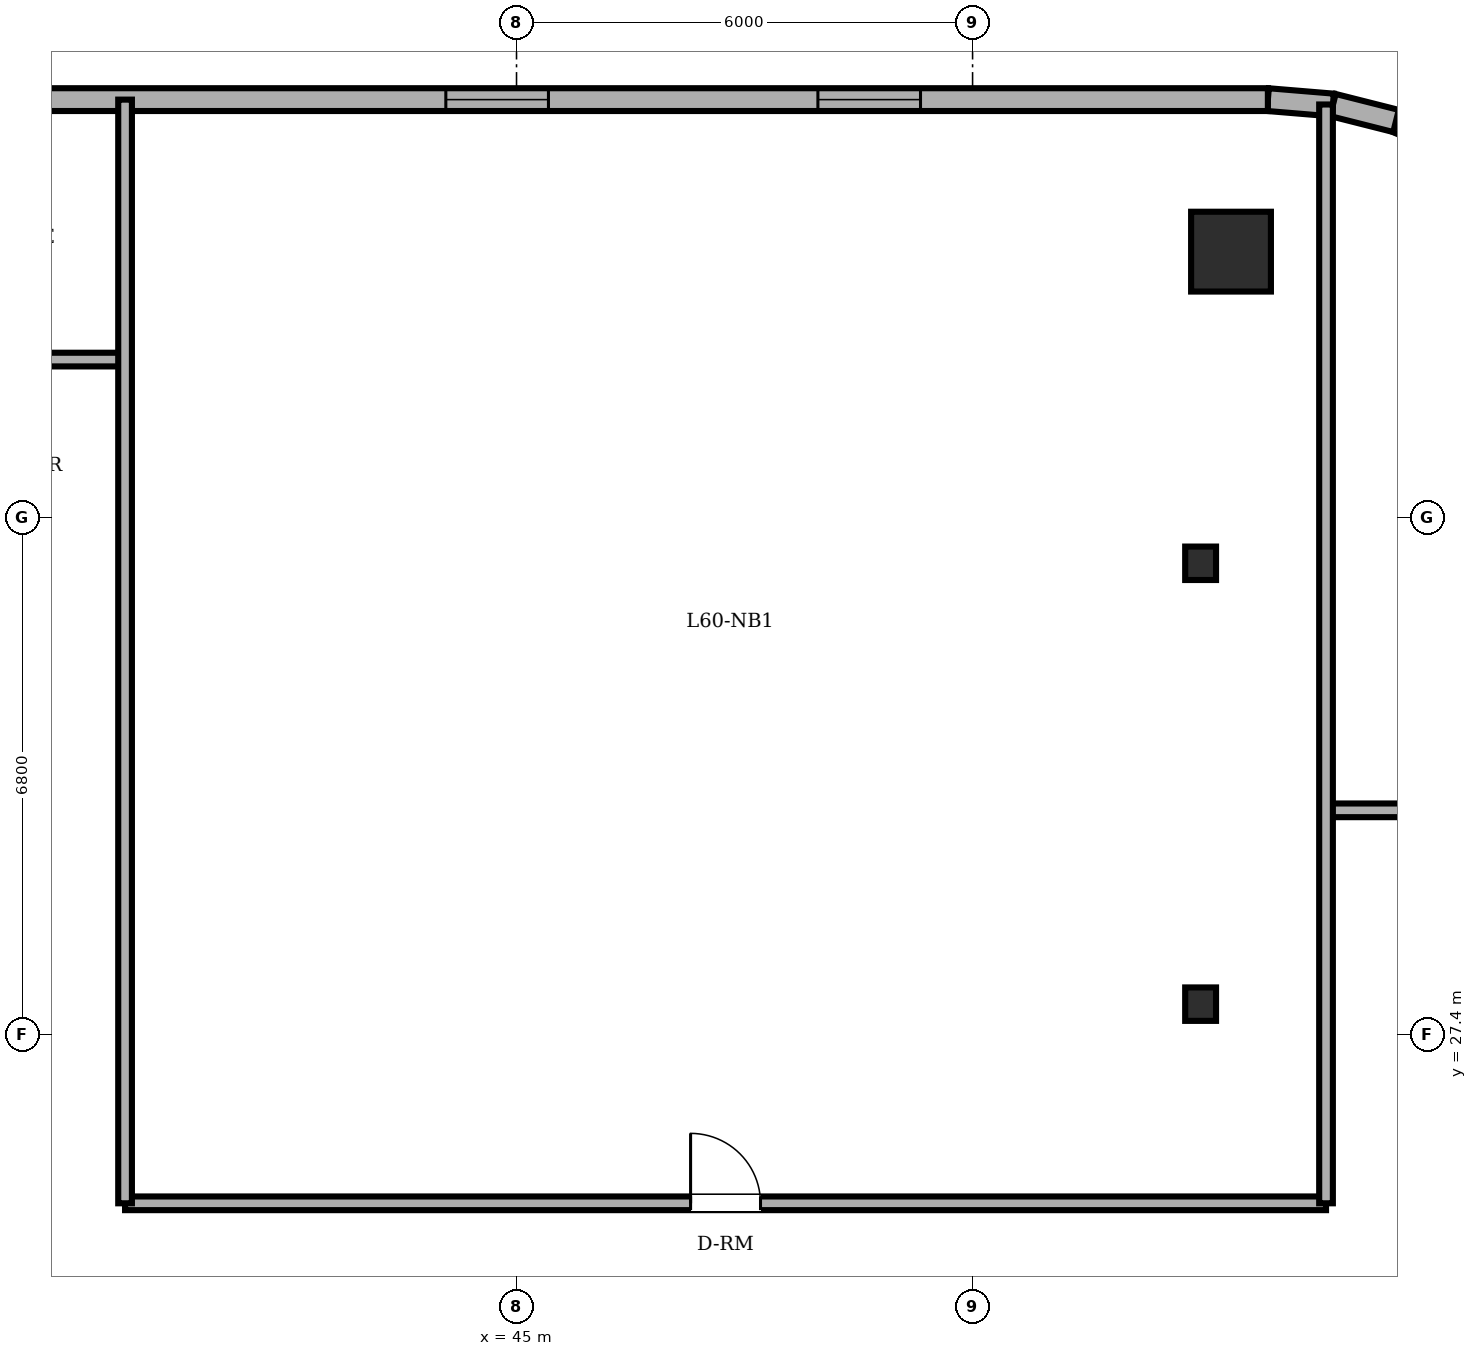
"""IFC4 building model, lengths in metres.
Left out: names, types, materials, properties, quantities, classifications, styles, units other than length and angle.
Written with IfcOpenShell. Run it as: python <this file> out.ifc"""

import sys

from ifc_helpers import new_model, si_unit, direction, frame, frame_2d, origin, origin_2d, place, context, subcontext, project, spatial, rectangle, circle, i_section, extrude, element, fill, save


model = new_model("IFC4")
c1 = context("Model", 3, precision=1e-05, world=origin(), true_north=direction((0.0, 1.0)))
c2 = subcontext(c1, "Body", "Model", "MODEL_VIEW")
j1 = project(units=[si_unit("LENGTHUNIT", "METRE"), si_unit("PLANEANGLEUNIT", "RADIAN")], contexts=[c1])
p1 = place(None, origin())
s1 = spatial("IfcSite", under=j1, at=p1, CompositionType="ELEMENT")
p2 = place(p1, origin())
s2 = spatial("IfcBuilding", under=s1, at=p2, CompositionType="ELEMENT")
p3 = place(p2, frame((0.0, 0.0, 230.1)))
s3 = spatial("IfcBuildingStorey", under=s2, at=p3, CompositionType="ELEMENT", Elevation=230.1)
p4 = place(p3, frame((54.4, 37.7, 0.0), z_axis=(0.0, 0.0, 1.0), x_axis=(1.0, 0.0, 0.0)))
e1 = element("IfcColumn", 1, at=p4, inside=s3, PredefinedType="COLUMN", context=c2, shape_type="SweptSolid", body=[
    extrude(circle(Radius=0.525, at=origin_2d()), origin(), (0.0, 0.0, 1.0), 3.6),
])
for number, where, z_axis, x_axis in (
    (2, (54.0, 27.8, 0.0), (0.0, 0.0, 1.0), (1.0, 0.0, 0.0)),
    (3, (54.0, 33.6, 0.0), (0.0, 0.0, 1.0), (1.0, 0.0, 0.0)),
):
    element("IfcColumn", number, at=place(p3, frame(where, z_axis=z_axis, x_axis=x_axis)), inside=s3, PredefinedType="COLUMN", context=c2, shape_type="SweptSolid", body=[
        extrude(i_section(OverallWidth=0.406, OverallDepth=0.44, WebThickness=0.024, FlangeThickness=0.039, FilletRadius=0.015, at=origin_2d()), origin(), (0.0, 0.0, 1.0), 3.6),
    ])
p5 = place(p3, frame((57.357, 39.075, 0.0), z_axis=(0.0, 0.0, 1.0), x_axis=(-0.916085473636, 0.400983048261, 0.0)))
e4 = element("IfcWall", 4, at=p5, inside=s3, PredefinedType="SOLIDWALL", context=c2, shape_type="SweptSolid", body=[
    extrude(rectangle(XDim=0.858, YDim=0.3, at=frame_2d((0.429, 0.0))), origin(), (0.0, 0.0, 1.0), 3.4),
])
p6 = place(p3, frame((56.571, 39.419, 0.0), z_axis=(0.0, 0.0, 1.0), x_axis=(-0.969536346338, 0.244947490555, 0.0)))
e5 = element("IfcWall", 5, at=p6, inside=s3, PredefinedType="SOLIDWALL", context=c2, shape_type="SweptSolid", body=[
    extrude(rectangle(XDim=0.857, YDim=0.3, at=frame_2d((0.429, 0.0))), origin(), (0.0, 0.0, 1.0), 3.4),
])
p7 = place(p3, frame((55.74, 39.629, 0.0), z_axis=(0.0, 0.0, 1.0), x_axis=(-0.996565355958, 0.082809971041, 0.0)))
e6 = element("IfcWall", 6, at=p7, inside=s3, PredefinedType="SOLIDWALL", context=c2, shape_type="SweptSolid", body=[
    extrude(rectangle(XDim=0.858, YDim=0.3, at=frame_2d((0.429, 0.0))), origin(), (0.0, 0.0, 1.0), 3.4),
])
p8 = place(p3, frame((54.885, 39.7, 0.0), z_axis=(0.0, 0.0, 1.0), x_axis=(-1.0, 0.0, 0.0)))
e7 = element("IfcWall", 7, at=p8, inside=s3, PredefinedType="SOLIDWALL", context=c2, shape_type="SweptSolid", body=[
    extrude(rectangle(XDim=32.485, YDim=0.3, at=frame_2d((16.243, 0.0))), origin(), (0.0, 0.0, 1.0), 3.4),
])
p9 = place(p8, frame((26.122, 0.0, 0.0)))
e8 = element("IfcOpeningElement", 8, at=p9, cuts=e7, PredefinedType="OPENING", context=c2, shape_type="SweptSolid", body=[
    extrude(rectangle(XDim=0.95, YDim=2.2, at=frame_2d((0.475, 1.1))), frame((0.0, 0.16, 0.0), z_axis=(0.0, -1.0, 0.0), x_axis=(1.0, 0.0, 0.0)), (0.0, 0.0, 1.0), 0.32),
])
p10 = place(p8, frame((4.57, 0.0, 0.85)))
e9 = element("IfcOpeningElement", 9, at=p10, cuts=e7, PredefinedType="OPENING", context=c2, shape_type="SweptSolid", body=[
    extrude(rectangle(XDim=1.35, YDim=1.55, at=frame_2d((0.675, 0.775))), frame((0.0, 0.16, 0.0), z_axis=(0.0, -1.0, 0.0), x_axis=(1.0, 0.0, 0.0)), (0.0, 0.0, 1.0), 0.32),
])
p11 = place(p8, frame((9.465, 0.0, 0.85)))
e10 = element("IfcOpeningElement", 10, at=p11, cuts=e7, PredefinedType="OPENING", context=c2, shape_type="SweptSolid", body=[
    extrude(rectangle(XDim=1.35, YDim=1.55, at=frame_2d((0.675, 0.775))), frame((0.0, 0.16, 0.0), z_axis=(0.0, -1.0, 0.0), x_axis=(1.0, 0.0, 0.0)), (0.0, 0.0, 1.0), 0.32),
])
p12 = place(p8, frame((16.577, 0.0, 0.85)))
e11 = element("IfcOpeningElement", 11, at=p12, cuts=e7, PredefinedType="OPENING", context=c2, shape_type="SweptSolid", body=[
    extrude(rectangle(XDim=1.35, YDim=1.55, at=frame_2d((0.675, 0.775))), frame((0.0, 0.16, 0.0), z_axis=(0.0, -1.0, 0.0), x_axis=(1.0, 0.0, 0.0)), (0.0, 0.0, 1.0), 0.32),
])
p13 = place(p8, frame((18.793, 0.0, 0.85)))
e12 = element("IfcOpeningElement", 12, at=p13, cuts=e7, PredefinedType="OPENING", context=c2, shape_type="SweptSolid", body=[
    extrude(rectangle(XDim=1.35, YDim=1.55, at=frame_2d((0.675, 0.775))), frame((0.0, 0.16, 0.0), z_axis=(0.0, -1.0, 0.0), x_axis=(1.0, 0.0, 0.0)), (0.0, 0.0, 1.0), 0.32),
])
p14 = place(p8, frame((22.91, 0.0, 0.85)))
e13 = element("IfcOpeningElement", 13, at=p14, cuts=e7, PredefinedType="OPENING", context=c2, shape_type="SweptSolid", body=[
    extrude(rectangle(XDim=1.35, YDim=1.55, at=frame_2d((0.675, 0.775))), frame((0.0, 0.16, 0.0), z_axis=(0.0, -1.0, 0.0), x_axis=(1.0, 0.0, 0.0)), (0.0, 0.0, 1.0), 0.32),
])
p15 = place(p8, frame((29.835, 0.0, 0.85)))
e14 = element("IfcOpeningElement", 14, at=p15, cuts=e7, PredefinedType="OPENING", context=c2, shape_type="SweptSolid", body=[
    extrude(rectangle(XDim=1.35, YDim=1.55, at=frame_2d((0.675, 0.775))), frame((0.0, 0.16, 0.0), z_axis=(0.0, -1.0, 0.0), x_axis=(1.0, 0.0, 0.0)), (0.0, 0.0, 1.0), 0.32),
])
p16 = place(p3, frame((39.85, 25.18, 0.0), z_axis=(0.0, 0.0, 1.0), x_axis=(1.0, 0.0, 0.0)))
e15 = element("IfcWall", 15, at=p16, inside=s3, PredefinedType="PARTITIONING", context=c2, shape_type="SweptSolid", body=[
    extrude(rectangle(XDim=15.8, YDim=0.18, at=frame_2d((7.9, 0.0))), origin(), (0.0, 0.0, 1.0), 3.4),
])
p17 = place(p16, frame((7.44, 0.0, 0.0)))
e16 = element("IfcOpeningElement", 16, at=p17, cuts=e15, PredefinedType="OPENING", context=c2, shape_type="SweptSolid", body=[
    extrude(rectangle(XDim=0.92, YDim=2.1, at=frame_2d((0.46, 1.05))), frame((0.0, 0.1, 0.0), z_axis=(0.0, -1.0, 0.0), x_axis=(1.0, 0.0, 0.0)), (0.0, 0.0, 1.0), 0.2),
])
p18 = place(p3, frame((55.65, 30.35, 0.0), z_axis=(0.0, 0.0, 1.0), x_axis=(1.0, 0.0, 0.0)))
e17 = element("IfcWall", 17, at=p18, inside=s3, PredefinedType="PARTITIONING", context=c2, shape_type="SweptSolid", body=[
    extrude(rectangle(XDim=12.868, YDim=0.18, at=frame_2d((6.434, 0.0))), origin(), (0.0, 0.0, 1.0), 3.4),
])
p19 = place(p18, frame((0.975, 0.0, 0.0)))
e18 = element("IfcOpeningElement", 18, at=p19, cuts=e17, PredefinedType="OPENING", context=c2, shape_type="SweptSolid", body=[
    extrude(rectangle(XDim=0.92, YDim=2.1, at=frame_2d((0.46, 1.05))), frame((0.0, 0.1, 0.0), z_axis=(0.0, -1.0, 0.0), x_axis=(1.0, 0.0, 0.0)), (0.0, 0.0, 1.0), 0.2),
])
p20 = place(p3, frame((17.677, 36.28, 0.0), z_axis=(0.0, 0.0, 1.0), x_axis=(1.0, 0.0, 0.0)))
e19 = element("IfcWall", 19, at=p20, inside=s3, PredefinedType="PARTITIONING", context=c2, shape_type="SweptSolid", body=[
    extrude(rectangle(XDim=22.173, YDim=0.18, at=frame_2d((11.086, 0.0))), origin(), (0.0, 0.0, 1.0), 3.4),
])
p21 = place(p20, frame((9.573, 0.0, 0.0)))
e20 = element("IfcOpeningElement", 20, at=p21, cuts=e19, PredefinedType="OPENING", context=c2, shape_type="SweptSolid", body=[
    extrude(rectangle(XDim=0.9, YDim=2.1, at=frame_2d((0.45, 1.05))), frame((0.0, 0.1, 0.0), z_axis=(0.0, -1.0, 0.0), x_axis=(1.0, 0.0, 0.0)), (0.0, 0.0, 1.0), 0.2),
])
p22 = place(p20, frame((13.193, 0.0, 0.0)))
e21 = element("IfcOpeningElement", 21, at=p22, cuts=e19, PredefinedType="OPENING", context=c2, shape_type="SweptSolid", body=[
    extrude(rectangle(XDim=0.86, YDim=2.1, at=frame_2d((0.43, 1.05))), frame((0.0, 0.1, 0.0), z_axis=(0.0, -1.0, 0.0), x_axis=(1.0, 0.0, 0.0)), (0.0, 0.0, 1.0), 0.2),
])
p23 = place(p20, frame((4.063, 0.0, 0.0)))
e22 = element("IfcOpeningElement", 22, at=p23, cuts=e19, PredefinedType="OPENING", context=c2, shape_type="SweptSolid", body=[
    extrude(rectangle(XDim=0.92, YDim=2.1, at=frame_2d((0.46, 1.05))), frame((0.0, 0.1, 0.0), z_axis=(0.0, -1.0, 0.0), x_axis=(1.0, 0.0, 0.0)), (0.0, 0.0, 1.0), 0.2),
])
p24 = place(p20, frame((18.128, 0.0, 0.0)))
e23 = element("IfcOpeningElement", 23, at=p24, cuts=e19, PredefinedType="OPENING", context=c2, shape_type="SweptSolid", body=[
    extrude(rectangle(XDim=0.92, YDim=2.1, at=frame_2d((0.46, 1.05))), frame((0.0, 0.1, 0.0), z_axis=(0.0, -1.0, 0.0), x_axis=(1.0, 0.0, 0.0)), (0.0, 0.0, 1.0), 0.2),
])
p25 = place(p3, frame((39.85, 25.18, 0.0), z_axis=(0.0, 0.0, 1.0), x_axis=(0.0, 1.0, 0.0)))
e24 = element("IfcWall", 24, at=p25, inside=s3, PredefinedType="PARTITIONING", context=c2, shape_type="SweptSolid", body=[
    extrude(rectangle(XDim=14.52, YDim=0.18, at=frame_2d((7.26, 0.0))), origin(), (0.0, 0.0, 1.0), 3.4),
])
p26 = place(p3, frame((55.65, 25.18, 0.0), z_axis=(0.0, 0.0, 1.0), x_axis=(0.0, 1.0, 0.0)))
e25 = element("IfcWall", 25, at=p26, inside=s3, PredefinedType="PARTITIONING", context=c2, shape_type="SweptSolid", body=[
    extrude(rectangle(XDim=14.456, YDim=0.18, at=frame_2d((7.228, 0.0))), origin(), (0.0, 0.0, 1.0), 3.4),
])
p27 = place(p10, origin())
e26 = element("IfcWindow", 26, at=p27, inside=s3, PartitioningType="SINGLE_PANEL", PredefinedType="WINDOW", context=c2, shape_type="SweptSolid", body=[
    extrude(rectangle(XDim=1.35, YDim=1.55, at=frame_2d((0.675, 0.775))), frame((0.0, 0.03, 0.0), z_axis=(0.0, -1.0, 0.0), x_axis=(1.0, 0.0, 0.0)), (0.0, 0.0, 1.0), 0.06),
])
fill(e9, e26)
p28 = place(p11, origin())
e27 = element("IfcWindow", 27, at=p28, inside=s3, PartitioningType="SINGLE_PANEL", PredefinedType="WINDOW", context=c2, shape_type="SweptSolid", body=[
    extrude(rectangle(XDim=1.35, YDim=1.55, at=frame_2d((0.675, 0.775))), frame((0.0, 0.03, 0.0), z_axis=(0.0, -1.0, 0.0), x_axis=(1.0, 0.0, 0.0)), (0.0, 0.0, 1.0), 0.06),
])
fill(e10, e27)
p29 = place(p17, origin())
e28 = element("IfcDoor", 28, at=p29, inside=s3, OperationType="SINGLE_SWING_LEFT", PredefinedType="DOOR", context=c2, shape_type="SweptSolid", body=[
    extrude(rectangle(XDim=0.92, YDim=2.1, at=frame_2d((0.46, 1.05))), frame((0.0, 0.025, 0.0), z_axis=(0.0, -1.0, 0.0), x_axis=(1.0, 0.0, 0.0)), (0.0, 0.0, 1.0), 0.05),
])
fill(e16, e28)
save(model, sys.argv[1])
